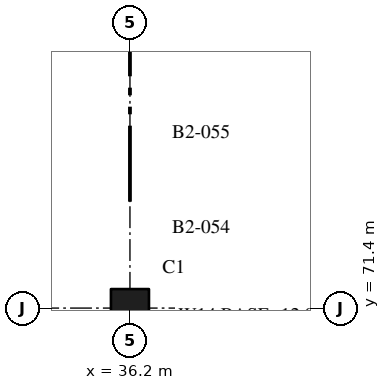
"""IFC4 building model, lengths in metres.
Left out: names, types, materials, properties, quantities, classifications, styles, units other than length and angle.
Written with IfcOpenShell. Run it as: python <this file> out.ifc"""

import sys

from ifc_helpers import new_model, si_unit, direction, frame, origin, origin_2d, place, context, subcontext, project, spatial, rectangle, extrude, element, save


model = new_model("IFC4")
c1 = context("Model", 3, precision=1e-05, world=origin(), true_north=direction((0.0, 1.0)))
c2 = subcontext(c1, "Body", "Model", "MODEL_VIEW")
j1 = project(units=[si_unit("LENGTHUNIT", "METRE"), si_unit("PLANEANGLEUNIT", "RADIAN")], contexts=[c1])
p1 = place(None, origin())
s1 = spatial("IfcSite", under=j1, at=p1, CompositionType="ELEMENT")
p2 = place(p1, origin())
s2 = spatial("IfcBuilding", under=s1, at=p2, CompositionType="ELEMENT")
p3 = place(p2, frame((0.0, 0.0, -12.0)))
s3 = spatial("IfcBuildingStorey", under=s2, at=p3, CompositionType="ELEMENT", Elevation=-12.0)
p4 = place(p3, frame((36.2, 71.4, 0.0), z_axis=(0.0, 0.0, 1.0), x_axis=(1.0, 0.0, 0.0)))
e1 = element("IfcColumn", 1, at=p4, inside=s3, PredefinedType="COLUMN", context=c2, shape_type="SweptSolid", body=[
    extrude(rectangle(XDim=1.0, YDim=1.0, at=origin_2d()), origin(), (0.0, 0.0, 1.0), 5.0),
])
save(model, sys.argv[1])
